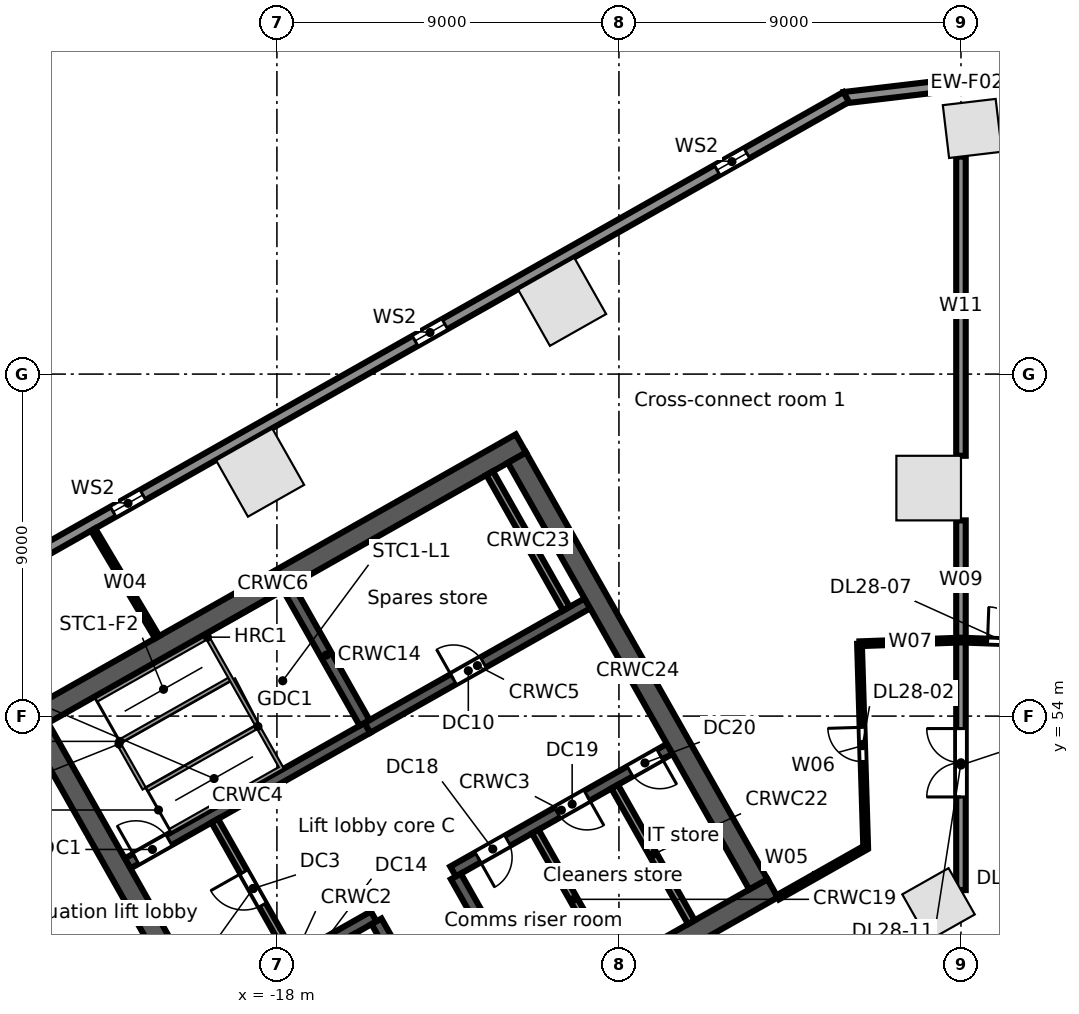
"""IFC4 building model, lengths in metres.
Left out: names, types, materials, properties, quantities, classifications, styles, units other than length and angle.
Written with IfcOpenShell. Run it as: python <this file> out.ifc"""

import sys

from ifc_helpers import new_model, si_unit, direction, frame, frame_2d, origin, origin_2d, place, context, subcontext, project, spatial, rectangle, extrude, element, fill, save


model = new_model("IFC4")
c1 = context("Model", 3, precision=1e-05, world=origin(), true_north=direction((0.0, 1.0)))
c2 = subcontext(c1, "Body", "Model", "MODEL_VIEW")
j1 = project(units=[si_unit("LENGTHUNIT", "METRE"), si_unit("PLANEANGLEUNIT", "RADIAN")], contexts=[c1])
p1 = place(None, origin())
s1 = spatial("IfcSite", under=j1, at=p1, CompositionType="ELEMENT")
p2 = place(p1, origin())
s2 = spatial("IfcBuilding", under=s1, at=p2, CompositionType="ELEMENT")
p3 = place(p2, frame((0.0, 0.0, 145.5)))
s3 = spatial("IfcBuildingStorey", under=s2, at=p3, CompositionType="ELEMENT", Elevation=145.5)
p4 = place(p3, frame((0.3, 69.464, 0.0), z_axis=(0.0, 0.0, 1.0), x_axis=(-0.993068456955, -0.117537397458, 0.0)))
e1 = element("IfcColumn", 1, at=p4, inside=s3, PredefinedType="COLUMN", context=c2, shape_type="SweptSolid", body=[
    extrude(rectangle(XDim=1.4, YDim=1.4, at=origin_2d()), origin(), (0.0, 0.0, 1.0), 4.4),
])
for number, where, z_axis, x_axis in (
    (2, (-10.495, 64.902, 0.0), (0.0, 0.0, 1.0), (-0.87, -0.492, 0.0)),
    (3, (-18.441, 60.406, 0.0), (0.0, 0.0, 1.0), (-0.87, -0.492, 0.0)),
):
    element("IfcColumn", number, at=place(p3, frame(where, z_axis=z_axis, x_axis=x_axis)), inside=s3, PredefinedType="COLUMN", context=c2, shape_type="SweptSolid", body=[
        extrude(rectangle(XDim=1.7, YDim=1.7, at=origin_2d()), origin(), (0.0, 0.0, 1.0), 4.4),
    ])
p5 = place(p3, frame((-0.591, 49.044, 0.0), z_axis=(0.0, 0.0, 1.0), x_axis=(0.87035569594, 0.492423560103, 0.0)))
e4 = element("IfcColumn", 4, at=p5, inside=s3, PredefinedType="COLUMN", context=c2, shape_type="SweptSolid", body=[
    extrude(rectangle(XDim=1.4, YDim=1.4, at=origin_2d()), origin(), (0.0, 0.0, 1.0), 4.4),
])
p6 = place(p3, frame((-0.85, 60.0, 0.0), z_axis=(0.0, 0.0, 1.0), x_axis=(0.0, 1.0, 0.0)))
e5 = element("IfcColumn", 5, at=p6, inside=s3, PredefinedType="COLUMN", context=c2, shape_type="SweptSolid", body=[
    extrude(rectangle(XDim=1.7, YDim=1.7, at=origin_2d()), origin(), (0.0, 0.0, 1.0), 4.4),
])
p7 = place(p3, frame((-3.076, 70.273, 0.0), z_axis=(0.0, 0.0, 1.0), x_axis=(0.993067743007, 0.117543429416, 0.0)))
e6 = element("IfcWall", 6, at=p7, inside=s3, PredefinedType="STANDARD", context=c2, shape_type="SweptSolid", body=[
    extrude(rectangle(XDim=6.516, YDim=0.3, at=frame_2d((3.258, 0.0))), origin(), (0.0, 0.0, 1.0), 4.05),
])
p8 = place(p3, frame((-58.745, 38.764, 0.0), z_axis=(0.0, 0.0, 1.0), x_axis=(0.870355811726, 0.492423355453, 0.0)))
e7 = element("IfcWall", 7, at=p8, inside=s3, PredefinedType="STANDARD", context=c2, shape_type="SweptSolid", body=[
    extrude(rectangle(XDim=64.025, YDim=0.3, at=frame_2d((32.013, 0.0))), origin(), (0.0, 0.0, 1.0), 4.05),
])
p9 = place(p8, frame((60.122, 0.0, 0.6)))
e8 = element("IfcOpeningElement", 8, at=p9, cuts=e7, PredefinedType="OPENING", context=c2, shape_type="SweptSolid", body=[
    extrude(rectangle(XDim=0.9, YDim=2.8, at=frame_2d((0.45, 1.4))), frame((0.0, 0.16, 0.0), z_axis=(0.0, -1.0, 0.0), x_axis=(1.0, 0.0, 0.0)), (0.0, 0.0, 1.0), 0.32),
])
p10 = place(p8, frame((50.992, 0.0, 0.6)))
e9 = element("IfcOpeningElement", 9, at=p10, cuts=e7, PredefinedType="OPENING", context=c2, shape_type="SweptSolid", body=[
    extrude(rectangle(XDim=0.9, YDim=2.8, at=frame_2d((0.45, 1.4))), frame((0.0, 0.16, 0.0), z_axis=(0.0, -1.0, 0.0), x_axis=(1.0, 0.0, 0.0)), (0.0, 0.0, 1.0), 0.32),
])
p11 = place(p8, frame((41.862, 0.0, 0.6)))
e10 = element("IfcOpeningElement", 10, at=p11, cuts=e7, PredefinedType="OPENING", context=c2, shape_type="SweptSolid", body=[
    extrude(rectangle(XDim=0.9, YDim=2.8, at=frame_2d((0.45, 1.4))), frame((0.0, 0.16, 0.0), z_axis=(0.0, -1.0, 0.0), x_axis=(1.0, 0.0, 0.0)), (0.0, 0.0, 1.0), 0.32),
])
p12 = place(p8, frame((32.732, 0.0, 0.6)))
e11 = element("IfcOpeningElement", 11, at=p12, cuts=e7, PredefinedType="OPENING", context=c2, shape_type="SweptSolid", body=[
    extrude(rectangle(XDim=0.9, YDim=2.8, at=frame_2d((0.45, 1.4))), frame((0.0, 0.16, 0.0), z_axis=(0.0, -1.0, 0.0), x_axis=(1.0, 0.0, 0.0)), (0.0, 0.0, 1.0), 0.32),
])
p13 = place(p8, frame((23.602, 0.0, 0.6)))
e12 = element("IfcOpeningElement", 12, at=p13, cuts=e7, PredefinedType="OPENING", context=c2, shape_type="SweptSolid", body=[
    extrude(rectangle(XDim=0.9, YDim=2.8, at=frame_2d((0.45, 1.4))), frame((0.0, 0.16, 0.0), z_axis=(0.0, -1.0, 0.0), x_axis=(1.0, 0.0, 0.0)), (0.0, 0.0, 1.0), 0.32),
])
p14 = place(p8, frame((14.472, 0.0, 0.6)))
e13 = element("IfcOpeningElement", 13, at=p14, cuts=e7, PredefinedType="OPENING", context=c2, shape_type="SweptSolid", body=[
    extrude(rectangle(XDim=0.9, YDim=2.8, at=frame_2d((0.45, 1.4))), frame((0.0, 0.16, 0.0), z_axis=(0.0, -1.0, 0.0), x_axis=(1.0, 0.0, 0.0)), (0.0, 0.0, 1.0), 0.32),
])
p15 = place(p8, frame((5.342, 0.0, 0.6)))
e14 = element("IfcOpeningElement", 14, at=p15, cuts=e7, PredefinedType="OPENING", context=c2, shape_type="SweptSolid", body=[
    extrude(rectangle(XDim=0.9, YDim=2.8, at=frame_2d((0.45, 1.4))), frame((0.0, 0.16, 0.0), z_axis=(0.0, -1.0, 0.0), x_axis=(1.0, 0.0, 0.0)), (0.0, 0.0, 1.0), 0.32),
])
p16 = place(p3, frame((-18.012, 42.083, 0.0), z_axis=(0.0, 0.0, 1.0), x_axis=(0.870360574057, 0.492414937962, 0.0)))
e15 = element("IfcWall", 15, at=p16, inside=s3, PredefinedType="SOLIDWALL", context=c2, shape_type="SweptSolid", body=[
    extrude(rectangle(XDim=15.0, YDim=0.55, at=frame_2d((7.5, 0.0))), origin(), (0.0, 0.0, 1.0), 4.05),
])
p17 = place(p16, frame((6.1, 0.0, 0.0)))
e16 = element("IfcOpeningElement", 16, at=p17, cuts=e15, PredefinedType="OPENING", context=c2, shape_type="SweptSolid", body=[
    extrude(rectangle(XDim=1.2, YDim=2.1, at=frame_2d((0.6, 1.05))), frame((0.0, 0.285, 0.0), z_axis=(0.0, -1.0, 0.0), x_axis=(1.0, 0.0, 0.0)), (0.0, 0.0, 1.0), 0.57),
])
p18 = place(p3, frame((-19.762, 46.292, 0.0), z_axis=(0.0, 0.0, 1.0), x_axis=(0.870359758983, 0.49241637863, 0.0)))
e17 = element("IfcWall", 17, at=p18, inside=s3, PredefinedType="SOLIDWALL", context=c2, shape_type="SweptSolid", body=[
    extrude(rectangle(XDim=4.95, YDim=0.3, at=frame_2d((2.475, 0.0))), origin(), (0.0, 0.0, 1.0), 4.05),
])
p19 = place(p18, frame((0.6, 0.0, 0.0)))
e18 = element("IfcOpeningElement", 18, at=p19, cuts=e17, PredefinedType="OPENING", context=c2, shape_type="SweptSolid", body=[
    extrude(rectangle(XDim=1.1, YDim=2.1, at=frame_2d((0.55, 1.05))), frame((0.0, 0.16, 0.0), z_axis=(0.0, -1.0, 0.0), x_axis=(1.0, 0.0, 0.0)), (0.0, 0.0, 1.0), 0.32),
])
p20 = place(p18, frame((2.9, 0.0, 0.0)))
e19 = element("IfcOpeningElement", 19, at=p20, cuts=e17, PredefinedType="OPENING", context=c2, shape_type="SweptSolid", body=[
    extrude(rectangle(XDim=0.9, YDim=2.1, at=frame_2d((0.45, 1.05))), frame((0.0, 0.16, 0.0), z_axis=(0.0, -1.0, 0.0), x_axis=(1.0, 0.0, 0.0)), (0.0, 0.0, 1.0), 0.32),
])
p21 = place(p3, frame((-13.365, 49.911, 0.0), z_axis=(0.0, 0.0, 1.0), x_axis=(0.870336435567, 0.492457601144, 0.0)))
e20 = element("IfcWall", 20, at=p21, inside=s3, PredefinedType="SOLIDWALL", context=c2, shape_type="SweptSolid", body=[
    extrude(rectangle(XDim=6.55, YDim=0.3, at=frame_2d((3.275, 0.0))), origin(), (0.0, 0.0, 1.0), 4.05),
])
p22 = place(p21, frame((0.75, 0.0, 0.0)))
e21 = element("IfcOpeningElement", 21, at=p22, cuts=e20, PredefinedType="OPENING", context=c2, shape_type="SweptSolid", body=[
    extrude(rectangle(XDim=0.9, YDim=2.1, at=frame_2d((0.45, 1.05))), frame((0.0, 0.16, 0.0), z_axis=(0.0, -1.0, 0.0), x_axis=(1.0, 0.0, 0.0)), (0.0, 0.0, 1.0), 0.32),
])
p23 = place(p21, frame((3.15, 0.0, 0.0)))
e22 = element("IfcOpeningElement", 22, at=p23, cuts=e20, PredefinedType="OPENING", context=c2, shape_type="SweptSolid", body=[
    extrude(rectangle(XDim=0.9, YDim=2.1, at=frame_2d((0.45, 1.05))), frame((0.0, 0.16, 0.0), z_axis=(0.0, -1.0, 0.0), x_axis=(1.0, 0.0, 0.0)), (0.0, 0.0, 1.0), 0.32),
])
p24 = place(p21, frame((5.35, 0.0, 0.0)))
e23 = element("IfcOpeningElement", 23, at=p24, cuts=e20, PredefinedType="OPENING", context=c2, shape_type="SweptSolid", body=[
    extrude(rectangle(XDim=0.9, YDim=2.1, at=frame_2d((0.45, 1.05))), frame((0.0, 0.16, 0.0), z_axis=(0.0, -1.0, 0.0), x_axis=(1.0, 0.0, 0.0)), (0.0, 0.0, 1.0), 0.32),
])
p25 = place(p3, frame((-21.928, 50.121, 0.0), z_axis=(0.0, 0.0, 1.0), x_axis=(0.870340732628, 0.49245000673, 0.0)))
e24 = element("IfcWall", 24, at=p25, inside=s3, PredefinedType="SOLIDWALL", context=c2, shape_type="SweptSolid", body=[
    extrude(rectangle(XDim=7.25, YDim=0.3, at=frame_2d((3.625, 0.0))), origin(), (0.0, 0.0, 1.0), 4.05),
])
p26 = place(p25, frame((0.25, 0.0, 0.0)))
e25 = element("IfcOpeningElement", 25, at=p26, cuts=e24, PredefinedType="OPENING", context=c2, shape_type="SweptSolid", body=[
    extrude(rectangle(XDim=1.0, YDim=2.1, at=frame_2d((0.5, 1.05))), frame((0.0, 0.16, 0.0), z_axis=(0.0, -1.0, 0.0), x_axis=(1.0, 0.0, 0.0)), (0.0, 0.0, 1.0), 0.32),
])
p27 = place(p3, frame((-15.618, 53.691, 0.0), z_axis=(0.0, 0.0, 1.0), x_axis=(0.870367894134, 0.492401999246, 0.0)))
e26 = element("IfcWall", 26, at=p27, inside=s3, PredefinedType="SOLIDWALL", context=c2, shape_type="SweptSolid", body=[
    extrude(rectangle(XDim=6.65, YDim=0.3, at=frame_2d((3.325, 0.0))), origin(), (0.0, 0.0, 1.0), 4.05),
])
p28 = place(p27, frame((2.6, 0.0, 0.0)))
e27 = element("IfcOpeningElement", 27, at=p28, cuts=e26, PredefinedType="OPENING", context=c2, shape_type="SweptSolid", body=[
    extrude(rectangle(XDim=0.9, YDim=2.1, at=frame_2d((0.45, 1.05))), frame((0.0, 0.16, 0.0), z_axis=(0.0, -1.0, 0.0), x_axis=(1.0, 0.0, 0.0)), (0.0, 0.0, 1.0), 0.32),
])
p29 = place(p3, frame((-24.635, 53.789, 0.0), z_axis=(0.0, 0.0, 1.0), x_axis=(0.870360574057, 0.492414937962, 0.0)))
e28 = element("IfcWall", 28, at=p29, inside=s3, PredefinedType="SOLIDWALL", context=c2, shape_type="SweptSolid", body=[
    extrude(rectangle(XDim=15.0, YDim=0.55, at=frame_2d((7.5, 0.0))), origin(), (0.0, 0.0, 1.0), 4.05),
])
p30 = place(p3, frame((-24.26, 53.685, 0.0), z_axis=(0.0, 0.0, 1.0), x_axis=(0.492427022044, -0.870353737259, 0.0)))
e29 = element("IfcWall", 29, at=p30, inside=s3, PredefinedType="SOLIDWALL", context=c2, shape_type="SweptSolid", body=[
    extrude(rectangle(XDim=12.9, YDim=0.55, at=frame_2d((6.45, 0.0))), origin(), (0.0, 0.0, 1.0), 4.05),
])
p31 = place(p3, frame((-19.635, 51.246, 0.0), z_axis=(0.0, 0.0, 1.0), x_axis=(0.492408451753, -0.87036424366, 0.0)))
e30 = element("IfcWall", 30, at=p31, inside=s3, PredefinedType="PARTITIONING", context=c2, shape_type="SweptSolid", body=[
    extrude(rectangle(XDim=4.1, YDim=0.2, at=frame_2d((2.05, 0.0))), origin(), (0.0, 0.0, 1.0), 4.05),
])
p32 = place(p31, frame((1.55, 0.0, 0.0)))
e31 = element("IfcOpeningElement", 31, at=p32, cuts=e30, PredefinedType="OPENING", context=c2, shape_type="SweptSolid", body=[
    extrude(rectangle(XDim=1.0, YDim=2.1, at=frame_2d((0.5, 1.05))), frame((0.0, 0.11, 0.0), z_axis=(0.0, -1.0, 0.0), x_axis=(1.0, 0.0, 0.0)), (0.0, 0.0, 1.0), 0.22),
])
for number, where, z_axis, x_axis in (
    (32, (-15.379, 48.599, 0.0), (0.0, 0.0, 1.0), (0.492, -0.87, 0.0)),
    (33, (-17.711, 57.39, 0.0), (0.0, 0.0, 1.0), (0.492, -0.87, 0.0)),
):
    element("IfcWall", number, at=place(p3, frame(where, z_axis=z_axis, x_axis=x_axis)), inside=s3, PredefinedType="SOLIDWALL", context=c2, shape_type="SweptSolid", body=[
        extrude(rectangle(XDim=4.1, YDim=0.3, at=frame_2d((2.05, 0.0))), origin(), (0.0, 0.0, 1.0), 4.05),
    ])
p33 = place(p3, frame((-13.291, 49.781, 0.0), z_axis=(0.0, 0.0, 1.0), x_axis=(0.492382931784, -0.870378681085, 0.0)))
e34 = element("IfcWall", 34, at=p33, inside=s3, PredefinedType="SOLIDWALL", context=c2, shape_type="SweptSolid", body=[
    extrude(rectangle(XDim=4.1, YDim=0.3, at=frame_2d((2.05, 0.0))), origin(), (0.0, 0.0, 1.0), 4.05),
])
p34 = place(p3, frame((-11.202, 50.962, 0.0), z_axis=(0.0, 0.0, 1.0), x_axis=(0.492428039142, -0.870353161807, 0.0)))
e35 = element("IfcWall", 35, at=p34, inside=s3, PredefinedType="PARTITIONING", context=c2, shape_type="SweptSolid", body=[
    extrude(rectangle(XDim=4.1, YDim=0.2, at=frame_2d((2.05, 0.0))), origin(), (0.0, 0.0, 1.0), 4.05),
])
p35 = place(p3, frame((-9.113, 52.144, 0.0), z_axis=(0.0, 0.0, 1.0), x_axis=(0.492408451753, -0.87036424366, 0.0)))
e36 = element("IfcWall", 36, at=p35, inside=s3, PredefinedType="PARTITIONING", context=c2, shape_type="SweptSolid", body=[
    extrude(rectangle(XDim=4.1, YDim=0.2, at=frame_2d((2.05, 0.0))), origin(), (0.0, 0.0, 1.0), 4.05),
])
p36 = place(p3, frame((-12.402, 60.394, 0.0), z_axis=(0.0, 0.0, 1.0), x_axis=(0.492453559952, -0.87033872216, 0.0)))
e37 = element("IfcWall", 37, at=p36, inside=s3, PredefinedType="SOLIDWALL", context=c2, shape_type="SweptSolid", body=[
    extrude(rectangle(XDim=4.1, YDim=0.2, at=frame_2d((2.05, 0.0))), origin(), (0.0, 0.0, 1.0), 4.05),
])
p37 = place(p3, frame((-11.684, 60.8, 0.0), z_axis=(0.0, 0.0, 1.0), x_axis=(0.492427022044, -0.870353737259, 0.0)))
e38 = element("IfcWall", 38, at=p37, inside=s3, PredefinedType="SOLIDWALL", context=c2, shape_type="SweptSolid", body=[
    extrude(rectangle(XDim=12.9, YDim=0.55, at=frame_2d((6.45, 0.0))), origin(), (0.0, 0.0, 1.0), 4.05),
])
p38 = place(p3, frame((-22.835, 58.908, 0.0), z_axis=(0.0, 0.0, 1.0), x_axis=(0.511113859879, -0.859513014584, 0.0)))
e39 = element("IfcWall", 39, at=p38, inside=s3, PredefinedType="PARTITIONING", context=c2, shape_type="SweptSolid", body=[
    extrude(rectangle(XDim=3.295, YDim=0.125, at=frame_2d((1.647, 0.0))), origin(), (0.0, 0.0, 1.0), 3.23),
])
p39 = place(p3, frame((-4.821, 49.23, 0.0), z_axis=(0.0, 0.0, 1.0), x_axis=(0.870371217631, 0.492396124598, 0.0)))
e40 = element("IfcWall", 40, at=p39, inside=s3, PredefinedType="PARTITIONING", context=c2, shape_type="SweptSolid", body=[
    extrude(rectangle(XDim=2.659, YDim=0.125, at=frame_2d((1.329, 0.0))), origin(), (0.0, 0.0, 1.0), 4.05),
])
p40 = place(p3, frame((-2.67, 55.904, 0.0), z_axis=(0.0, 0.0, 1.0), x_axis=(0.030338701418, -0.999539675649, 0.0)))
e41 = element("IfcWall", 41, at=p40, inside=s3, PredefinedType="PARTITIONING", context=c2, shape_type="SweptSolid", body=[
    extrude(rectangle(XDim=5.367, YDim=0.125, at=frame_2d((2.684, 0.0))), origin(), (0.0, 0.0, 1.0), 3.222),
])
p41 = place(p40, frame((2.2, 0.0, 0.0)))
e42 = element("IfcOpeningElement", 42, at=p41, cuts=e41, PredefinedType="OPENING", context=c2, shape_type="SweptSolid", body=[
    extrude(rectangle(XDim=0.9, YDim=2.1, at=frame_2d((0.45, 1.05))), frame((0.0, 0.073, 0.0), z_axis=(0.0, -1.0, 0.0), x_axis=(1.0, 0.0, 0.0)), (0.0, 0.0, 1.0), 0.145),
])
p42 = place(p3, frame((-2.67, 55.904, 0.0), z_axis=(0.0, 0.0, 1.0), x_axis=(0.999354913865, 0.03591317494, 0.0)))
e43 = element("IfcWall", 43, at=p42, inside=s3, PredefinedType="PARTITIONING", context=c2, shape_type="SweptSolid", body=[
    extrude(rectangle(XDim=2.672, YDim=0.125, at=frame_2d((1.336, 0.0))), origin(), (0.0, 0.0, 1.0), 4.05),
])
p43 = place(p3, frame((0.0, 49.422, 0.0), z_axis=(0.0, 0.0, 1.0), x_axis=(0.0, 1.0, 0.0)))
e44 = element("IfcWall", 44, at=p43, inside=s3, PredefinedType="PARTITIONING", context=c2, shape_type="SweptSolid", body=[
    extrude(rectangle(XDim=6.578, YDim=0.25, at=frame_2d((3.289, 0.0))), origin(), (0.0, 0.0, 1.0), 3.23),
])
p44 = place(p43, frame((2.45, 0.0, 0.0)))
e45 = element("IfcOpeningElement", 45, at=p44, cuts=e44, PredefinedType="OPENING", context=c2, shape_type="SweptSolid", body=[
    extrude(rectangle(XDim=1.8, YDim=2.1, at=frame_2d((0.9, 1.05))), frame((0.0, 0.135, 0.0), z_axis=(0.0, -1.0, 0.0), x_axis=(1.0, 0.0, 0.0)), (0.0, 0.0, 1.0), 0.27),
])
p45 = place(p3, frame((0.0, 56.0, 0.0), z_axis=(0.0, 0.0, 1.0), x_axis=(0.0, 1.0, 0.0)))
e46 = element("IfcWall", 46, at=p45, inside=s3, PredefinedType="PARTITIONING", context=c2, shape_type="SweptSolid", body=[
    extrude(rectangle(XDim=3.15, YDim=0.25, at=frame_2d((1.575, 0.0))), origin(), (0.0, 0.0, 1.0), 4.05),
])
p46 = place(p3, frame((0.0, 56.0, 0.0), z_axis=(0.0, 0.0, 1.0), x_axis=(0.999349313684, -0.036068673934, 0.0)))
e47 = element("IfcWall", 47, at=p46, inside=s3, PredefinedType="PARTITIONING", context=c2, shape_type="SweptSolid", body=[
    extrude(rectangle(XDim=2.471, YDim=0.125, at=frame_2d((1.235, 0.0))), origin(), (0.0, 0.0, 1.0), 4.05),
])
p47 = place(p46, frame((0.7, 0.0, 0.0)))
e48 = element("IfcOpeningElement", 48, at=p47, cuts=e47, PredefinedType="OPENING", context=c2, shape_type="SweptSolid", body=[
    extrude(rectangle(XDim=0.9, YDim=2.1, at=frame_2d((0.45, 1.05))), frame((0.0, 0.073, 0.0), z_axis=(0.0, -1.0, 0.0), x_axis=(1.0, 0.0, 0.0)), (0.0, 0.0, 1.0), 0.145),
])
p48 = place(p3, frame((0.0, 60.85, 0.0), z_axis=(0.0, 0.0, 1.0), x_axis=(0.0, 1.0, 0.0)))
e49 = element("IfcWall", 49, at=p48, inside=s3, PredefinedType="PARTITIONING", context=c2, shape_type="SweptSolid", body=[
    extrude(rectangle(XDim=7.874, YDim=0.25, at=frame_2d((3.937, 0.0))), origin(), (0.0, 0.0, 1.0), 3.23),
])
p49 = place(p9, origin())
e50 = element("IfcWindow", 50, at=p49, inside=s3, PartitioningType="SINGLE_PANEL", PredefinedType="WINDOW", context=c2, shape_type="SweptSolid", body=[
    extrude(rectangle(XDim=0.9, YDim=2.8, at=frame_2d((0.45, 1.4))), frame((0.0, 0.03, 0.0), z_axis=(0.0, -1.0, 0.0), x_axis=(1.0, 0.0, 0.0)), (0.0, 0.0, 1.0), 0.06),
])
fill(e8, e50)
p50 = place(p10, origin())
e51 = element("IfcWindow", 51, at=p50, inside=s3, PartitioningType="SINGLE_PANEL", PredefinedType="WINDOW", context=c2, shape_type="SweptSolid", body=[
    extrude(rectangle(XDim=0.9, YDim=2.8, at=frame_2d((0.45, 1.4))), frame((0.0, 0.03, 0.0), z_axis=(0.0, -1.0, 0.0), x_axis=(1.0, 0.0, 0.0)), (0.0, 0.0, 1.0), 0.06),
])
fill(e9, e51)
p51 = place(p11, origin())
e52 = element("IfcWindow", 52, at=p51, inside=s3, PartitioningType="SINGLE_PANEL", PredefinedType="WINDOW", context=c2, shape_type="SweptSolid", body=[
    extrude(rectangle(XDim=0.9, YDim=2.8, at=frame_2d((0.45, 1.4))), frame((0.0, 0.03, 0.0), z_axis=(0.0, -1.0, 0.0), x_axis=(1.0, 0.0, 0.0)), (0.0, 0.0, 1.0), 0.06),
])
fill(e10, e52)
p52 = place(p26, origin())
e53 = element("IfcDoor", 53, at=p52, inside=s3, OperationType="SINGLE_SWING_LEFT", PredefinedType="DOOR", context=c2, shape_type="SweptSolid", body=[
    extrude(rectangle(XDim=1.0, YDim=2.1, at=frame_2d((0.5, 1.05))), frame((0.0, 0.025, 0.0), z_axis=(0.0, -1.0, 0.0), x_axis=(1.0, 0.0, 0.0)), (0.0, 0.0, 1.0), 0.05),
])
fill(e25, e53)
p53 = place(p32, frame((1.0, 0.0, 0.0), z_axis=(0.0, 0.0, 1.0), x_axis=(-1.0, 0.0, 0.0)))
e54 = element("IfcDoor", 54, at=p53, inside=s3, OperationType="SINGLE_SWING_RIGHT", PredefinedType="DOOR", context=c2, shape_type="SweptSolid", body=[
    extrude(rectangle(XDim=1.0, YDim=2.1, at=frame_2d((0.5, 1.05))), frame((0.0, 0.025, 0.0), z_axis=(0.0, -1.0, 0.0), x_axis=(1.0, 0.0, 0.0)), (0.0, 0.0, 1.0), 0.05),
])
fill(e31, e54)
p54 = place(p28, origin())
e55 = element("IfcDoor", 55, at=p54, inside=s3, OperationType="SINGLE_SWING_LEFT", PredefinedType="DOOR", context=c2, shape_type="SweptSolid", body=[
    extrude(rectangle(XDim=0.9, YDim=2.1, at=frame_2d((0.45, 1.05))), frame((0.0, 0.025, 0.0), z_axis=(0.0, -1.0, 0.0), x_axis=(1.0, 0.0, 0.0)), (0.0, 0.0, 1.0), 0.05),
])
fill(e27, e55)
p55 = place(p22, frame((0.9, 0.0, 0.0), z_axis=(0.0, 0.0, 1.0), x_axis=(-1.0, 0.0, 0.0)))
e56 = element("IfcDoor", 56, at=p55, inside=s3, OperationType="SINGLE_SWING_RIGHT", PredefinedType="DOOR", context=c2, shape_type="SweptSolid", body=[
    extrude(rectangle(XDim=0.9, YDim=2.1, at=frame_2d((0.45, 1.05))), frame((0.0, 0.025, 0.0), z_axis=(0.0, -1.0, 0.0), x_axis=(1.0, 0.0, 0.0)), (0.0, 0.0, 1.0), 0.05),
])
fill(e21, e56)
p56 = place(p23, frame((0.9, 0.0, 0.0), z_axis=(0.0, 0.0, 1.0), x_axis=(-1.0, 0.0, 0.0)))
e57 = element("IfcDoor", 57, at=p56, inside=s3, OperationType="SINGLE_SWING_LEFT", PredefinedType="DOOR", context=c2, shape_type="SweptSolid", body=[
    extrude(rectangle(XDim=0.9, YDim=2.1, at=frame_2d((0.45, 1.05))), frame((0.0, 0.025, 0.0), z_axis=(0.0, -1.0, 0.0), x_axis=(1.0, 0.0, 0.0)), (0.0, 0.0, 1.0), 0.05),
])
fill(e22, e57)
p57 = place(p24, frame((0.9, 0.0, 0.0), z_axis=(0.0, 0.0, 1.0), x_axis=(-1.0, 0.0, 0.0)))
e58 = element("IfcDoor", 58, at=p57, inside=s3, OperationType="SINGLE_SWING_LEFT", PredefinedType="DOOR", context=c2, shape_type="SweptSolid", body=[
    extrude(rectangle(XDim=0.9, YDim=2.1, at=frame_2d((0.45, 1.05))), frame((0.0, 0.025, 0.0), z_axis=(0.0, -1.0, 0.0), x_axis=(1.0, 0.0, 0.0)), (0.0, 0.0, 1.0), 0.05),
])
fill(e23, e58)
p58 = place(p41, frame((0.9, 0.0, 0.0), z_axis=(0.0, 0.0, 1.0), x_axis=(-1.0, 0.0, 0.0)))
e59 = element("IfcDoor", 59, at=p58, inside=s3, OperationType="SINGLE_SWING_RIGHT", PredefinedType="DOOR", context=c2, shape_type="SweptSolid", body=[
    extrude(rectangle(XDim=0.9, YDim=2.1, at=frame_2d((0.45, 1.05))), frame((0.0, 0.025, 0.0), z_axis=(0.0, -1.0, 0.0), x_axis=(1.0, 0.0, 0.0)), (0.0, 0.0, 1.0), 0.05),
])
fill(e42, e59)
p59 = place(p47, origin())
e60 = element("IfcDoor", 60, at=p59, inside=s3, OperationType="SINGLE_SWING_LEFT", PredefinedType="DOOR", context=c2, shape_type="SweptSolid", body=[
    extrude(rectangle(XDim=0.9, YDim=2.1, at=frame_2d((0.45, 1.05))), frame((0.0, 0.025, 0.0), z_axis=(0.0, -1.0, 0.0), x_axis=(1.0, 0.0, 0.0)), (0.0, 0.0, 1.0), 0.05),
])
fill(e48, e60)
p60 = place(p44, origin())
e61 = element("IfcDoor", 61, at=p60, inside=s3, OperationType="DOUBLE_DOOR_SINGLE_SWING", PredefinedType="DOOR", context=c2, shape_type="SweptSolid", body=[
    extrude(rectangle(XDim=1.8, YDim=2.1, at=frame_2d((0.9, 1.05))), frame((0.0, 0.025, 0.0), z_axis=(0.0, -1.0, 0.0), x_axis=(1.0, 0.0, 0.0)), (0.0, 0.0, 1.0), 0.05),
])
fill(e45, e61)
save(model, sys.argv[1])
